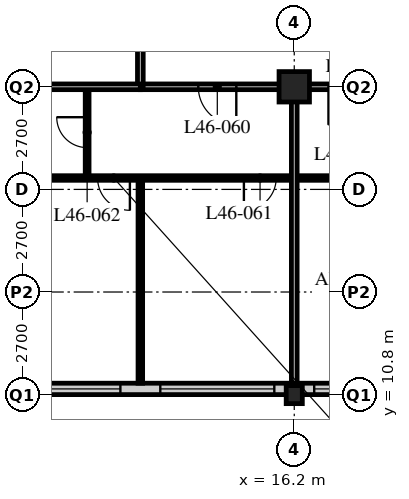
"""IFC4 building model, lengths in metres.
Left out: names, types, materials, properties, quantities, classifications, styles, units other than length and angle.
Written with IfcOpenShell. Run it as: python <this file> out.ifc"""

import sys

from ifc_helpers import new_model, si_unit, direction, frame, frame_2d, origin, origin_2d, place, context, subcontext, project, spatial, rectangle, hollow_rectangle, i_section, extrude, element, fill, save


model = new_model("IFC4")
c1 = context("Model", 3, precision=1e-05, world=origin(), true_north=direction((0.0, 1.0)))
c2 = subcontext(c1, "Body", "Model", "MODEL_VIEW")
j1 = project(units=[si_unit("LENGTHUNIT", "METRE"), si_unit("PLANEANGLEUNIT", "RADIAN")], contexts=[c1])
p1 = place(None, origin())
s1 = spatial("IfcSite", under=j1, at=p1, CompositionType="ELEMENT")
p2 = place(p1, origin())
s2 = spatial("IfcBuilding", under=s1, at=p2, CompositionType="ELEMENT")
p3 = place(p2, frame((0.0, 0.0, 181.2)))
s3 = spatial("IfcBuildingStorey", under=s2, at=p3, CompositionType="ELEMENT", Elevation=181.2)
p4 = place(p3, frame((16.2, 10.8, 0.0), z_axis=(0.0, 0.0, 1.0), x_axis=(1.0, 0.0, 0.0)))
e1 = element("IfcColumn", 1, at=p4, inside=s3, PredefinedType="COLUMN", context=c2, shape_type="SweptSolid", body=[
    extrude(i_section(OverallWidth=0.424, OverallDepth=0.475, WebThickness=0.048, FlangeThickness=0.077, FilletRadius=0.015, at=origin_2d()), origin(), (0.0, 0.0, 1.0), 3.6),
])
p5 = place(p3, frame((16.2, 18.9, 0.0), z_axis=(0.0, 0.0, 1.0), x_axis=(1.0, 0.0, 0.0)))
e2 = element("IfcColumn", 2, at=p5, inside=s3, PredefinedType="COLUMN", context=c2, shape_type="SweptSolid", body=[
    extrude(hollow_rectangle(XDim=0.8, YDim=0.8, WallThickness=0.08, at=origin_2d()), origin(), (0.0, 0.0, 1.0), 3.6),
])
p6 = place(p3, frame((8.4, 10.95, 0.0), z_axis=(0.0, 0.0, 1.0), x_axis=(1.0, 0.0, 0.0)))
e3 = element("IfcWall", 3, at=p6, inside=s3, PredefinedType="SOLIDWALL", context=c2, shape_type="SweptSolid", body=[
    extrude(rectangle(XDim=40.2, YDim=0.3, at=frame_2d((20.1, 0.0))), origin(), (0.0, 0.0, 1.0), 3.39),
])
p7 = place(p6, frame((0.225, 0.0, 0.6)))
e4 = element("IfcOpeningElement", 4, at=p7, cuts=e3, PredefinedType="OPENING", context=c2, shape_type="SweptSolid", body=[
    extrude(rectangle(XDim=3.0, YDim=2.4, at=frame_2d((1.5, 1.2))), frame((0.0, 0.16, 0.0), z_axis=(0.0, -1.0, 0.0), x_axis=(1.0, 0.0, 0.0)), (0.0, 0.0, 1.0), 0.32),
])
p8 = place(p6, frame((4.275, 0.0, 0.6)))
e5 = element("IfcOpeningElement", 5, at=p8, cuts=e3, PredefinedType="OPENING", context=c2, shape_type="SweptSolid", body=[
    extrude(rectangle(XDim=3.0, YDim=2.4, at=frame_2d((1.5, 1.2))), frame((0.0, 0.16, 0.0), z_axis=(0.0, -1.0, 0.0), x_axis=(1.0, 0.0, 0.0)), (0.0, 0.0, 1.0), 0.32),
])
p9 = place(p6, frame((8.325, 0.0, 0.6)))
e6 = element("IfcOpeningElement", 6, at=p9, cuts=e3, PredefinedType="OPENING", context=c2, shape_type="SweptSolid", body=[
    extrude(rectangle(XDim=3.0, YDim=2.4, at=frame_2d((1.5, 1.2))), frame((0.0, 0.16, 0.0), z_axis=(0.0, -1.0, 0.0), x_axis=(1.0, 0.0, 0.0)), (0.0, 0.0, 1.0), 0.32),
])
p10 = place(p6, frame((12.375, 0.0, 0.6)))
e7 = element("IfcOpeningElement", 7, at=p10, cuts=e3, PredefinedType="OPENING", context=c2, shape_type="SweptSolid", body=[
    extrude(rectangle(XDim=3.0, YDim=2.4, at=frame_2d((1.5, 1.2))), frame((0.0, 0.16, 0.0), z_axis=(0.0, -1.0, 0.0), x_axis=(1.0, 0.0, 0.0)), (0.0, 0.0, 1.0), 0.32),
])
p11 = place(p6, frame((16.425, 0.0, 0.6)))
e8 = element("IfcOpeningElement", 8, at=p11, cuts=e3, PredefinedType="OPENING", context=c2, shape_type="SweptSolid", body=[
    extrude(rectangle(XDim=3.0, YDim=2.4, at=frame_2d((1.5, 1.2))), frame((0.0, 0.16, 0.0), z_axis=(0.0, -1.0, 0.0), x_axis=(1.0, 0.0, 0.0)), (0.0, 0.0, 1.0), 0.32),
])
p12 = place(p6, frame((20.475, 0.0, 0.6)))
e9 = element("IfcOpeningElement", 9, at=p12, cuts=e3, PredefinedType="OPENING", context=c2, shape_type="SweptSolid", body=[
    extrude(rectangle(XDim=3.0, YDim=2.4, at=frame_2d((1.5, 1.2))), frame((0.0, 0.16, 0.0), z_axis=(0.0, -1.0, 0.0), x_axis=(1.0, 0.0, 0.0)), (0.0, 0.0, 1.0), 0.32),
])
p13 = place(p6, frame((24.525, 0.0, 0.6)))
e10 = element("IfcOpeningElement", 10, at=p13, cuts=e3, PredefinedType="OPENING", context=c2, shape_type="SweptSolid", body=[
    extrude(rectangle(XDim=3.0, YDim=2.4, at=frame_2d((1.5, 1.2))), frame((0.0, 0.16, 0.0), z_axis=(0.0, -1.0, 0.0), x_axis=(1.0, 0.0, 0.0)), (0.0, 0.0, 1.0), 0.32),
])
p14 = place(p6, frame((28.575, 0.0, 0.6)))
e11 = element("IfcOpeningElement", 11, at=p14, cuts=e3, PredefinedType="OPENING", context=c2, shape_type="SweptSolid", body=[
    extrude(rectangle(XDim=3.0, YDim=2.4, at=frame_2d((1.5, 1.2))), frame((0.0, 0.16, 0.0), z_axis=(0.0, -1.0, 0.0), x_axis=(1.0, 0.0, 0.0)), (0.0, 0.0, 1.0), 0.32),
])
p15 = place(p6, frame((32.625, 0.0, 0.6)))
e12 = element("IfcOpeningElement", 12, at=p15, cuts=e3, PredefinedType="OPENING", context=c2, shape_type="SweptSolid", body=[
    extrude(rectangle(XDim=3.0, YDim=2.4, at=frame_2d((1.5, 1.2))), frame((0.0, 0.16, 0.0), z_axis=(0.0, -1.0, 0.0), x_axis=(1.0, 0.0, 0.0)), (0.0, 0.0, 1.0), 0.32),
])
p16 = place(p6, frame((36.675, 0.0, 0.6)))
e13 = element("IfcOpeningElement", 13, at=p16, cuts=e3, PredefinedType="OPENING", context=c2, shape_type="SweptSolid", body=[
    extrude(rectangle(XDim=3.0, YDim=2.4, at=frame_2d((1.5, 1.2))), frame((0.0, 0.16, 0.0), z_axis=(0.0, -1.0, 0.0), x_axis=(1.0, 0.0, 0.0)), (0.0, 0.0, 1.0), 0.32),
])
p17 = place(p3, frame((12.15, 18.9, 0.0), z_axis=(0.0, 0.0, 1.0), x_axis=(1.0, 0.0, 0.0)))
e14 = element("IfcWall", 14, at=p17, inside=s3, PredefinedType="PARTITIONING", context=c2, shape_type="SweptSolid", body=[
    extrude(rectangle(XDim=32.4, YDim=0.15, at=frame_2d((16.2, 0.0))), origin(), (0.0, 0.0, 1.0), 2.778),
])
p18 = place(p17, frame((4.95, 0.0, 0.0)))
e15 = element("IfcOpeningElement", 15, at=p18, cuts=e14, PredefinedType="OPENING", context=c2, shape_type="SweptSolid", body=[
    extrude(rectangle(XDim=1.0, YDim=2.1, at=frame_2d((0.5, 1.05))), frame((0.0, 0.085, 0.0), z_axis=(0.0, -1.0, 0.0), x_axis=(1.0, 0.0, 0.0)), (0.0, 0.0, 1.0), 0.17),
])
p19 = place(p17, frame((13.05, 0.0, 0.0)))
e16 = element("IfcOpeningElement", 16, at=p19, cuts=e14, PredefinedType="OPENING", context=c2, shape_type="SweptSolid", body=[
    extrude(rectangle(XDim=1.0, YDim=2.1, at=frame_2d((0.5, 1.05))), frame((0.0, 0.085, 0.0), z_axis=(0.0, -1.0, 0.0), x_axis=(1.0, 0.0, 0.0)), (0.0, 0.0, 1.0), 0.17),
])
p20 = place(p17, frame((21.15, 0.0, 0.0)))
e17 = element("IfcOpeningElement", 17, at=p20, cuts=e14, PredefinedType="OPENING", context=c2, shape_type="SweptSolid", body=[
    extrude(rectangle(XDim=1.0, YDim=2.1, at=frame_2d((0.5, 1.05))), frame((0.0, 0.085, 0.0), z_axis=(0.0, -1.0, 0.0), x_axis=(1.0, 0.0, 0.0)), (0.0, 0.0, 1.0), 0.17),
])
p21 = place(p17, frame((1.525, 0.0, 0.0)))
e18 = element("IfcOpeningElement", 18, at=p21, cuts=e14, PredefinedType="OPENING", context=c2, shape_type="SweptSolid", body=[
    extrude(rectangle(XDim=1.0, YDim=2.1, at=frame_2d((0.5, 1.05))), frame((0.0, 0.085, 0.0), z_axis=(0.0, -1.0, 0.0), x_axis=(1.0, 0.0, 0.0)), (0.0, 0.0, 1.0), 0.17),
])
p22 = place(p17, frame((29.875, 0.0, 0.0)))
e19 = element("IfcOpeningElement", 19, at=p22, cuts=e14, PredefinedType="OPENING", context=c2, shape_type="SweptSolid", body=[
    extrude(rectangle(XDim=1.0, YDim=2.1, at=frame_2d((0.5, 1.05))), frame((0.0, 0.085, 0.0), z_axis=(0.0, -1.0, 0.0), x_axis=(1.0, 0.0, 0.0)), (0.0, 0.0, 1.0), 0.17),
])
p23 = place(p3, frame((12.15, 18.9, 0.0), z_axis=(0.0, 0.0, 1.0), x_axis=(0.0, 1.0, 0.0)))
e20 = element("IfcWall", 20, at=p23, inside=s3, PredefinedType="PARTITIONING", context=c2, shape_type="SweptSolid", body=[
    extrude(rectangle(XDim=28.35, YDim=0.15, at=frame_2d((14.175, 0.0))), origin(), (0.0, 0.0, 1.0), 3.39),
])
p24 = place(p23, frame((2.35, 0.0, 0.0)))
e21 = element("IfcOpeningElement", 21, at=p24, cuts=e20, PredefinedType="OPENING", context=c2, shape_type="SweptSolid", body=[
    extrude(rectangle(XDim=1.0, YDim=2.1, at=frame_2d((0.5, 1.05))), frame((0.0, 0.085, 0.0), z_axis=(0.0, -1.0, 0.0), x_axis=(1.0, 0.0, 0.0)), (0.0, 0.0, 1.0), 0.17),
])
p25 = place(p23, frame((6.4, 0.0, 0.0)))
e22 = element("IfcOpeningElement", 22, at=p25, cuts=e20, PredefinedType="OPENING", context=c2, shape_type="SweptSolid", body=[
    extrude(rectangle(XDim=1.0, YDim=2.1, at=frame_2d((0.5, 1.05))), frame((0.0, 0.085, 0.0), z_axis=(0.0, -1.0, 0.0), x_axis=(1.0, 0.0, 0.0)), (0.0, 0.0, 1.0), 0.17),
])
p26 = place(p23, frame((8.5, 0.0, 0.0)))
e23 = element("IfcOpeningElement", 23, at=p26, cuts=e20, PredefinedType="OPENING", context=c2, shape_type="SweptSolid", body=[
    extrude(rectangle(XDim=1.0, YDim=2.1, at=frame_2d((0.5, 1.05))), frame((0.0, 0.085, 0.0), z_axis=(0.0, -1.0, 0.0), x_axis=(1.0, 0.0, 0.0)), (0.0, 0.0, 1.0), 0.17),
])
p27 = place(p23, frame((16.6, 0.0, 0.0)))
e24 = element("IfcOpeningElement", 24, at=p27, cuts=e20, PredefinedType="OPENING", context=c2, shape_type="SweptSolid", body=[
    extrude(rectangle(XDim=1.0, YDim=2.1, at=frame_2d((0.5, 1.05))), frame((0.0, 0.085, 0.0), z_axis=(0.0, -1.0, 0.0), x_axis=(1.0, 0.0, 0.0)), (0.0, 0.0, 1.0), 0.17),
])
p28 = place(p23, frame((26.65, 0.0, 0.0)))
e25 = element("IfcOpeningElement", 25, at=p28, cuts=e20, PredefinedType="OPENING", context=c2, shape_type="SweptSolid", body=[
    extrude(rectangle(XDim=1.0, YDim=2.1, at=frame_2d((0.5, 1.05))), frame((0.0, 0.085, 0.0), z_axis=(0.0, -1.0, 0.0), x_axis=(1.0, 0.0, 0.0)), (0.0, 0.0, 1.0), 0.17),
])
p29 = place(p3, frame((10.75, 18.9, 0.0), z_axis=(0.0, 0.0, 1.0), x_axis=(0.0, -1.0, 0.0)))
e26 = element("IfcWall", 26, at=p29, inside=s3, PredefinedType="PARTITIONING", context=c2, shape_type="SweptSolid", body=[
    extrude(rectangle(XDim=2.4, YDim=0.1, at=frame_2d((1.2, 0.0))), origin(), (0.0, 0.0, 1.0), 3.39),
])
p30 = place(p29, frame((0.8, 0.0, 0.0)))
e27 = element("IfcOpeningElement", 27, at=p30, cuts=e26, PredefinedType="OPENING", context=c2, shape_type="SweptSolid", body=[
    extrude(rectangle(XDim=0.8, YDim=2.1, at=frame_2d((0.4, 1.05))), frame((0.0, 0.06, 0.0), z_axis=(0.0, -1.0, 0.0), x_axis=(1.0, 0.0, 0.0)), (0.0, 0.0, 1.0), 0.12),
])
p31 = place(p3, frame((8.15, 16.5, 0.0), z_axis=(0.0, 0.0, 1.0), x_axis=(1.0, 0.0, 0.0)))
e28 = element("IfcWall", 28, at=p31, inside=s3, PredefinedType="PARTITIONING", context=c2, shape_type="SweptSolid", body=[
    extrude(rectangle(XDim=40.4, YDim=0.12, at=frame_2d((20.2, 0.0))), origin(), (0.0, 0.0, 1.0), 3.39),
])
p32 = place(p31, frame((9.025, 0.0, 0.0)))
e29 = element("IfcOpeningElement", 29, at=p32, cuts=e28, PredefinedType="OPENING", context=c2, shape_type="SweptSolid", body=[
    extrude(rectangle(XDim=0.85, YDim=2.1, at=frame_2d((0.425, 1.05))), frame((0.0, 0.07, 0.0), z_axis=(0.0, -1.0, 0.0), x_axis=(1.0, 0.0, 0.0)), (0.0, 0.0, 1.0), 0.14),
])
p33 = place(p31, frame((12.425, 0.0, 0.0)))
e30 = element("IfcOpeningElement", 30, at=p33, cuts=e28, PredefinedType="OPENING", context=c2, shape_type="SweptSolid", body=[
    extrude(rectangle(XDim=0.85, YDim=2.1, at=frame_2d((0.425, 1.05))), frame((0.0, 0.07, 0.0), z_axis=(0.0, -1.0, 0.0), x_axis=(1.0, 0.0, 0.0)), (0.0, 0.0, 1.0), 0.14),
])
p34 = place(p31, frame((17.125, 0.0, 0.0)))
e31 = element("IfcOpeningElement", 31, at=p34, cuts=e28, PredefinedType="OPENING", context=c2, shape_type="SweptSolid", body=[
    extrude(rectangle(XDim=0.85, YDim=2.1, at=frame_2d((0.425, 1.05))), frame((0.0, 0.07, 0.0), z_axis=(0.0, -1.0, 0.0), x_axis=(1.0, 0.0, 0.0)), (0.0, 0.0, 1.0), 0.14),
])
p35 = place(p31, frame((20.525, 0.0, 0.0)))
e32 = element("IfcOpeningElement", 32, at=p35, cuts=e28, PredefinedType="OPENING", context=c2, shape_type="SweptSolid", body=[
    extrude(rectangle(XDim=0.85, YDim=2.1, at=frame_2d((0.425, 1.05))), frame((0.0, 0.07, 0.0), z_axis=(0.0, -1.0, 0.0), x_axis=(1.0, 0.0, 0.0)), (0.0, 0.0, 1.0), 0.14),
])
p36 = place(p31, frame((25.225, 0.0, 0.0)))
e33 = element("IfcOpeningElement", 33, at=p36, cuts=e28, PredefinedType="OPENING", context=c2, shape_type="SweptSolid", body=[
    extrude(rectangle(XDim=0.85, YDim=2.1, at=frame_2d((0.425, 1.05))), frame((0.0, 0.07, 0.0), z_axis=(0.0, -1.0, 0.0), x_axis=(1.0, 0.0, 0.0)), (0.0, 0.0, 1.0), 0.14),
])
p37 = place(p31, frame((28.625, 0.0, 0.0)))
e34 = element("IfcOpeningElement", 34, at=p37, cuts=e28, PredefinedType="OPENING", context=c2, shape_type="SweptSolid", body=[
    extrude(rectangle(XDim=0.85, YDim=2.1, at=frame_2d((0.425, 1.05))), frame((0.0, 0.07, 0.0), z_axis=(0.0, -1.0, 0.0), x_axis=(1.0, 0.0, 0.0)), (0.0, 0.0, 1.0), 0.14),
])
p38 = place(p31, frame((6.725, 0.0, 0.0)))
e35 = element("IfcOpeningElement", 35, at=p38, cuts=e28, PredefinedType="OPENING", context=c2, shape_type="SweptSolid", body=[
    extrude(rectangle(XDim=0.85, YDim=2.1, at=frame_2d((0.425, 1.05))), frame((0.0, 0.07, 0.0), z_axis=(0.0, -1.0, 0.0), x_axis=(1.0, 0.0, 0.0)), (0.0, 0.0, 1.0), 0.14),
])
p39 = place(p31, frame((2.875, 0.0, 0.0)))
e36 = element("IfcOpeningElement", 36, at=p39, cuts=e28, PredefinedType="OPENING", context=c2, shape_type="SweptSolid", body=[
    extrude(rectangle(XDim=0.85, YDim=2.1, at=frame_2d((0.425, 1.05))), frame((0.0, 0.07, 0.0), z_axis=(0.0, -1.0, 0.0), x_axis=(1.0, 0.0, 0.0)), (0.0, 0.0, 1.0), 0.14),
])
p40 = place(p31, frame((32.825, 0.0, 0.0)))
e37 = element("IfcOpeningElement", 37, at=p40, cuts=e28, PredefinedType="OPENING", context=c2, shape_type="SweptSolid", body=[
    extrude(rectangle(XDim=0.85, YDim=2.1, at=frame_2d((0.425, 1.05))), frame((0.0, 0.07, 0.0), z_axis=(0.0, -1.0, 0.0), x_axis=(1.0, 0.0, 0.0)), (0.0, 0.0, 1.0), 0.14),
])
p41 = place(p31, frame((36.675, 0.0, 0.0)))
e38 = element("IfcOpeningElement", 38, at=p41, cuts=e28, PredefinedType="OPENING", context=c2, shape_type="SweptSolid", body=[
    extrude(rectangle(XDim=0.85, YDim=2.1, at=frame_2d((0.425, 1.05))), frame((0.0, 0.07, 0.0), z_axis=(0.0, -1.0, 0.0), x_axis=(1.0, 0.0, 0.0)), (0.0, 0.0, 1.0), 0.14),
])
p42 = place(p3, frame((12.15, 16.5, 0.0), z_axis=(0.0, 0.0, 1.0), x_axis=(0.0, -1.0, 0.0)))
e39 = element("IfcWall", 39, at=p42, inside=s3, PredefinedType="PARTITIONING", context=c2, shape_type="SweptSolid", body=[
    extrude(rectangle(XDim=5.4, YDim=0.12, at=frame_2d((2.7, 0.0))), origin(), (0.0, 0.0, 1.0), 3.39),
])
for number, where, z_axis, x_axis in (
    (40, (4.35, 18.9, 0.0), (0.0, 0.0, 1.0), (1.0, 0.0, 0.0)),
    (41, (16.2, 18.9, 0.0), (0.0, 0.0, 1.0), (0.0, -1.0, 0.0)),
):
    element("IfcWall", number, at=place(p3, frame(where, z_axis=z_axis, x_axis=x_axis)), inside=s3, PredefinedType="PARTITIONING", context=c2, shape_type="SweptSolid", body=[
        extrude(rectangle(XDim=7.8, YDim=0.15, at=frame_2d((3.9, 0.0))), origin(), (0.0, 0.0, 1.0), 2.778),
    ])
p43 = place(p7, origin())
e42 = element("IfcWindow", 42, at=p43, inside=s3, PartitioningType="SINGLE_PANEL", PredefinedType="WINDOW", context=c2, shape_type="SweptSolid", body=[
    extrude(rectangle(XDim=3.0, YDim=2.4, at=frame_2d((1.5, 1.2))), frame((0.0, 0.03, 0.0), z_axis=(0.0, -1.0, 0.0), x_axis=(1.0, 0.0, 0.0)), (0.0, 0.0, 1.0), 0.06),
])
fill(e4, e42)
p44 = place(p8, origin())
e43 = element("IfcWindow", 43, at=p44, inside=s3, PartitioningType="SINGLE_PANEL", PredefinedType="WINDOW", context=c2, shape_type="SweptSolid", body=[
    extrude(rectangle(XDim=3.0, YDim=2.4, at=frame_2d((1.5, 1.2))), frame((0.0, 0.03, 0.0), z_axis=(0.0, -1.0, 0.0), x_axis=(1.0, 0.0, 0.0)), (0.0, 0.0, 1.0), 0.06),
])
fill(e5, e43)
p45 = place(p9, origin())
e44 = element("IfcWindow", 44, at=p45, inside=s3, PartitioningType="SINGLE_PANEL", PredefinedType="WINDOW", context=c2, shape_type="SweptSolid", body=[
    extrude(rectangle(XDim=3.0, YDim=2.4, at=frame_2d((1.5, 1.2))), frame((0.0, 0.03, 0.0), z_axis=(0.0, -1.0, 0.0), x_axis=(1.0, 0.0, 0.0)), (0.0, 0.0, 1.0), 0.06),
])
fill(e6, e44)
p46 = place(p18, origin())
e45 = element("IfcDoor", 45, at=p46, inside=s3, OperationType="SINGLE_SWING_RIGHT", PredefinedType="DOOR", context=c2, shape_type="SweptSolid", body=[
    extrude(rectangle(XDim=1.0, YDim=2.1, at=frame_2d((0.5, 1.05))), frame((0.0, 0.025, 0.0), z_axis=(0.0, -1.0, 0.0), x_axis=(1.0, 0.0, 0.0)), (0.0, 0.0, 1.0), 0.05),
])
fill(e15, e45)
p47 = place(p21, origin())
e46 = element("IfcDoor", 46, at=p47, inside=s3, OperationType="SINGLE_SWING_LEFT", PredefinedType="DOOR", context=c2, shape_type="SweptSolid", body=[
    extrude(rectangle(XDim=1.0, YDim=2.1, at=frame_2d((0.5, 1.05))), frame((0.0, 0.025, 0.0), z_axis=(0.0, -1.0, 0.0), x_axis=(1.0, 0.0, 0.0)), (0.0, 0.0, 1.0), 0.05),
])
fill(e18, e46)
p48 = place(p38, origin())
e47 = element("IfcDoor", 47, at=p48, inside=s3, OperationType="SINGLE_SWING_RIGHT", PredefinedType="DOOR", context=c2, shape_type="SweptSolid", body=[
    extrude(rectangle(XDim=0.85, YDim=2.1, at=frame_2d((0.425, 1.05))), frame((0.0, 0.025, 0.0), z_axis=(0.0, -1.0, 0.0), x_axis=(1.0, 0.0, 0.0)), (0.0, 0.0, 1.0), 0.05),
])
fill(e35, e47)
p49 = place(p30, origin())
e48 = element("IfcDoor", 48, at=p49, inside=s3, OperationType="SINGLE_SWING_RIGHT", PredefinedType="DOOR", context=c2, shape_type="SweptSolid", body=[
    extrude(rectangle(XDim=0.8, YDim=2.1, at=frame_2d((0.4, 1.05))), frame((0.0, 0.025, 0.0), z_axis=(0.0, -1.0, 0.0), x_axis=(1.0, 0.0, 0.0)), (0.0, 0.0, 1.0), 0.05),
])
fill(e27, e48)
p50 = place(p39, origin())
e49 = element("IfcDoor", 49, at=p50, inside=s3, OperationType="SINGLE_SWING_LEFT", PredefinedType="DOOR", context=c2, shape_type="SweptSolid", body=[
    extrude(rectangle(XDim=0.85, YDim=2.1, at=frame_2d((0.425, 1.05))), frame((0.0, 0.025, 0.0), z_axis=(0.0, -1.0, 0.0), x_axis=(1.0, 0.0, 0.0)), (0.0, 0.0, 1.0), 0.05),
])
fill(e36, e49)
save(model, sys.argv[1])
